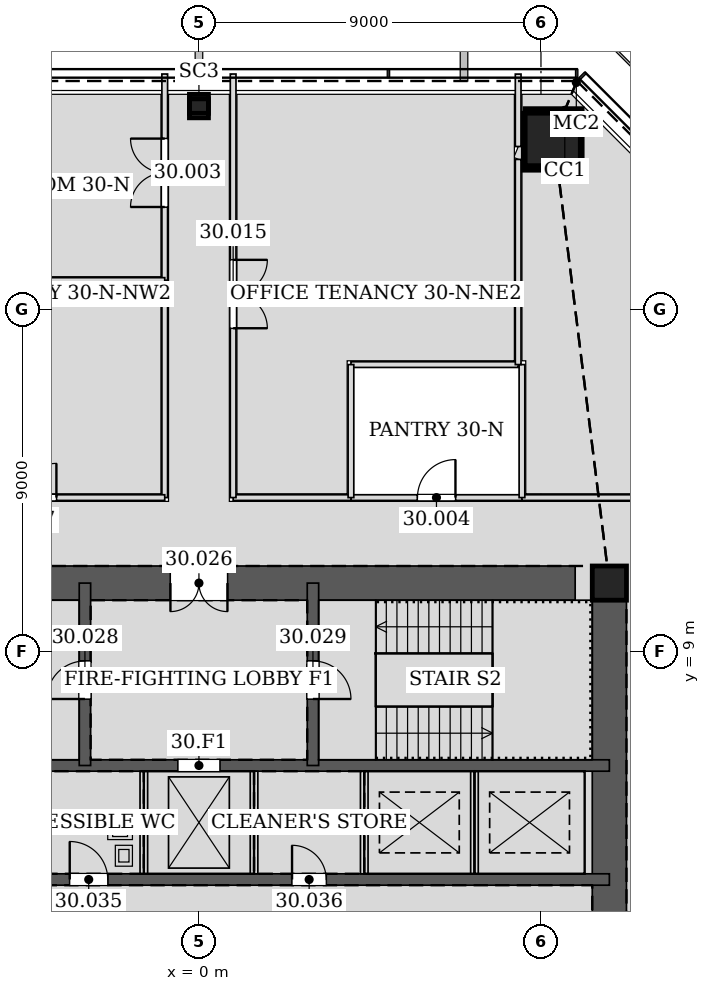
"""IFC4 building model, lengths in metres.
Left out: names, types, materials, properties, quantities, classifications, styles, units other than length and angle.
Written with IfcOpenShell. Run it as: python <this file> out.ifc"""

import sys

from ifc_helpers import new_model, si_unit, direction, frame, frame_2d, origin, origin_2d, place, context, subcontext, project, spatial, rectangle, hollow_rectangle, extrude, element, fill, save


model = new_model("IFC4")
c1 = context("Model", 3, precision=1e-05, world=origin(), true_north=direction((0.0, 1.0)))
c2 = subcontext(c1, "Body", "Model", "MODEL_VIEW")
j1 = project(units=[si_unit("LENGTHUNIT", "METRE"), si_unit("PLANEANGLEUNIT", "RADIAN")], contexts=[c1])
p1 = place(None, origin())
s1 = spatial("IfcSite", under=j1, at=p1, CompositionType="ELEMENT")
p2 = place(p1, origin())
s2 = spatial("IfcBuilding", under=s1, at=p2, CompositionType="ELEMENT")
p3 = place(p2, frame((0.0, 0.0, 134.4)))
s3 = spatial("IfcBuildingStorey", under=s2, at=p3, CompositionType="ELEMENT", Elevation=134.4)
p4 = place(p3, frame((9.334, 22.534, 0.0), z_axis=(-0.011677874129, -0.028236053864, 0.999533067246), x_axis=(0.924086310396, -0.382183844423, 0.0)))
e1 = element("IfcColumn", 1, at=p4, inside=s3, PredefinedType="COLUMN", context=c2, shape_type="SweptSolid", body=[
    extrude(hollow_rectangle(XDim=1.5, YDim=1.5, WallThickness=0.07, at=origin_2d()), origin(), (0.0, 0.0, 1.0), 4.202),
])
p5 = place(p3, frame((0.0, 23.413, 0.0), z_axis=(0.0, -0.02829603574, 0.999599587015), x_axis=(1.0, 0.0, 0.0)))
e2 = element("IfcColumn", 2, at=p5, inside=s3, PredefinedType="COLUMN", context=c2, shape_type="SweptSolid", body=[
    extrude(hollow_rectangle(XDim=0.5, YDim=0.5, WallThickness=0.025, at=origin_2d()), origin(), (0.0, 0.0, 1.0), 4.202),
])
p6 = place(p3, frame((10.8, 10.8, 0.0), z_axis=(0.0, 0.0, 1.0), x_axis=(1.0, 0.0, 0.0)))
e3 = element("IfcColumn", 3, at=p6, inside=s3, PredefinedType="COLUMN", context=c2, shape_type="SweptSolid", body=[
    extrude(hollow_rectangle(XDim=0.9, YDim=0.9, WallThickness=0.06, at=origin_2d()), origin(), (0.0, 0.0, 1.0), 4.2),
])
p7 = place(p3, frame((10.8, -10.8, 0.0), z_axis=(0.0, 0.0, 1.0), x_axis=(0.0, 1.0, 0.0)))
e4 = element("IfcWall", 4, at=p7, inside=s3, PredefinedType="SOLIDWALL", context=c2, shape_type="SweptSolid", body=[
    extrude(rectangle(XDim=21.6, YDim=0.9, at=frame_2d((10.8, 0.0))), origin(), (0.0, 0.0, 1.0), 4.2),
])
p8 = place(p7, frame((11.7, 0.0, 0.0)))
e5 = element("IfcOpeningElement", 5, at=p8, cuts=e4, PredefinedType="OPENING", context=c2, shape_type="SweptSolid", body=[
    extrude(rectangle(XDim=1.2, YDim=2.1, at=frame_2d((0.6, 1.05))), frame((0.0, 0.46, 0.0), z_axis=(0.0, -1.0, 0.0), x_axis=(1.0, 0.0, 0.0)), (0.0, 0.0, 1.0), 0.92),
])
p9 = place(p7, frame((8.7, 0.0, 0.0)))
e6 = element("IfcOpeningElement", 6, at=p9, cuts=e4, PredefinedType="OPENING", context=c2, shape_type="SweptSolid", body=[
    extrude(rectangle(XDim=1.2, YDim=2.1, at=frame_2d((0.6, 1.05))), frame((0.0, 0.46, 0.0), z_axis=(0.0, -1.0, 0.0), x_axis=(1.0, 0.0, 0.0)), (0.0, 0.0, 1.0), 0.92),
])
p10 = place(p3, frame((10.8, 10.8, 0.0), z_axis=(0.0, 0.0, 1.0), x_axis=(-1.0, 0.0, 0.0)))
e7 = element("IfcWall", 7, at=p10, inside=s3, PredefinedType="SOLIDWALL", context=c2, shape_type="SweptSolid", body=[
    extrude(rectangle(XDim=21.6, YDim=0.9, at=frame_2d((10.8, 0.0))), origin(), (0.0, 0.0, 1.0), 4.2),
])
p11 = place(p10, frame((10.05, 0.0, 0.0)))
e8 = element("IfcOpeningElement", 8, at=p11, cuts=e7, PredefinedType="OPENING", context=c2, shape_type="SweptSolid", body=[
    extrude(rectangle(XDim=1.5, YDim=2.1, at=frame_2d((0.75, 1.05))), frame((0.0, 0.46, 0.0), z_axis=(0.0, -1.0, 0.0), x_axis=(1.0, 0.0, 0.0)), (0.0, 0.0, 1.0), 0.92),
])
p12 = place(p3, frame((-10.8, 3.0, 0.0), z_axis=(0.0, 0.0, 1.0), x_axis=(1.0, 0.0, 0.0)))
e9 = element("IfcWall", 9, at=p12, inside=s3, PredefinedType="SOLIDWALL", context=c2, shape_type="SweptSolid", body=[
    extrude(rectangle(XDim=21.6, YDim=0.3, at=frame_2d((10.8, 0.0))), origin(), (0.0, 0.0, 1.0), 4.2),
])
p13 = place(p12, frame((1.65, 0.0, 0.0)))
e10 = element("IfcOpeningElement", 10, at=p13, cuts=e9, PredefinedType="OPENING", context=c2, shape_type="SweptSolid", body=[
    extrude(rectangle(XDim=0.9, YDim=2.1, at=frame_2d((0.45, 1.05))), frame((0.0, 0.16, 0.0), z_axis=(0.0, -1.0, 0.0), x_axis=(1.0, 0.0, 0.0)), (0.0, 0.0, 1.0), 0.32),
])
p14 = place(p12, frame((4.55, 0.0, 0.0)))
e11 = element("IfcOpeningElement", 11, at=p14, cuts=e9, PredefinedType="OPENING", context=c2, shape_type="SweptSolid", body=[
    extrude(rectangle(XDim=0.9, YDim=2.1, at=frame_2d((0.45, 1.05))), frame((0.0, 0.16, 0.0), z_axis=(0.0, -1.0, 0.0), x_axis=(1.0, 0.0, 0.0)), (0.0, 0.0, 1.0), 0.32),
])
p15 = place(p12, frame((7.4, 0.0, 0.0)))
e12 = element("IfcOpeningElement", 12, at=p15, cuts=e9, PredefinedType="OPENING", context=c2, shape_type="SweptSolid", body=[
    extrude(rectangle(XDim=1.0, YDim=2.1, at=frame_2d((0.5, 1.05))), frame((0.0, 0.16, 0.0), z_axis=(0.0, -1.0, 0.0), x_axis=(1.0, 0.0, 0.0)), (0.0, 0.0, 1.0), 0.32),
])
p16 = place(p12, frame((13.25, 0.0, 0.0)))
e13 = element("IfcOpeningElement", 13, at=p16, cuts=e9, PredefinedType="OPENING", context=c2, shape_type="SweptSolid", body=[
    extrude(rectangle(XDim=0.9, YDim=2.1, at=frame_2d((0.45, 1.05))), frame((0.0, 0.16, 0.0), z_axis=(0.0, -1.0, 0.0), x_axis=(1.0, 0.0, 0.0)), (0.0, 0.0, 1.0), 0.32),
])
p17 = place(p3, frame((-10.8, 6.0, 0.0), z_axis=(0.0, 0.0, 1.0), x_axis=(1.0, 0.0, 0.0)))
e14 = element("IfcWall", 14, at=p17, inside=s3, PredefinedType="SOLIDWALL", context=c2, shape_type="SweptSolid", body=[
    extrude(rectangle(XDim=21.6, YDim=0.3, at=frame_2d((10.8, 0.0))), origin(), (0.0, 0.0, 1.0), 4.2),
])
p18 = place(p17, frame((10.25, 0.0, 0.0)))
e15 = element("IfcOpeningElement", 15, at=p18, cuts=e14, PredefinedType="OPENING", context=c2, shape_type="SweptSolid", body=[
    extrude(rectangle(XDim=1.1, YDim=2.1, at=frame_2d((0.55, 1.05))), frame((0.0, 0.16, 0.0), z_axis=(0.0, -1.0, 0.0), x_axis=(1.0, 0.0, 0.0)), (0.0, 0.0, 1.0), 0.32),
])
p19 = place(p3, frame((-3.0, 6.0, 0.0), z_axis=(0.0, 0.0, 1.0), x_axis=(0.0, 1.0, 0.0)))
e16 = element("IfcWall", 16, at=p19, inside=s3, PredefinedType="SOLIDWALL", context=c2, shape_type="SweptSolid", body=[
    extrude(rectangle(XDim=4.8, YDim=0.3, at=frame_2d((2.4, 0.0))), origin(), (0.0, 0.0, 1.0), 4.2),
])
p20 = place(p19, frame((1.75, 0.0, 0.0)))
e17 = element("IfcOpeningElement", 17, at=p20, cuts=e16, PredefinedType="OPENING", context=c2, shape_type="SweptSolid", body=[
    extrude(rectangle(XDim=1.0, YDim=2.1, at=frame_2d((0.5, 1.05))), frame((0.0, 0.16, 0.0), z_axis=(0.0, -1.0, 0.0), x_axis=(1.0, 0.0, 0.0)), (0.0, 0.0, 1.0), 0.32),
])
p21 = place(p3, frame((3.0, 6.0, 0.0), z_axis=(0.0, 0.0, 1.0), x_axis=(0.0, 1.0, 0.0)))
e18 = element("IfcWall", 18, at=p21, inside=s3, PredefinedType="SOLIDWALL", context=c2, shape_type="SweptSolid", body=[
    extrude(rectangle(XDim=4.8, YDim=0.3, at=frame_2d((2.4, 0.0))), origin(), (0.0, 0.0, 1.0), 4.2),
])
p22 = place(p21, frame((1.75, 0.0, 0.0)))
e19 = element("IfcOpeningElement", 19, at=p22, cuts=e18, PredefinedType="OPENING", context=c2, shape_type="SweptSolid", body=[
    extrude(rectangle(XDim=1.0, YDim=2.1, at=frame_2d((0.5, 1.05))), frame((0.0, 0.16, 0.0), z_axis=(0.0, -1.0, 0.0), x_axis=(1.0, 0.0, 0.0)), (0.0, 0.0, 1.0), 0.32),
])
p23 = place(p3, frame((-0.9, 24.197, 0.0), z_axis=(0.0, 0.0, 1.0), x_axis=(0.0, -1.0, 0.0)))
e20 = element("IfcWall", 20, at=p23, inside=s3, PredefinedType="PARTITIONING", context=c2, shape_type="SweptSolid", body=[
    extrude(rectangle(XDim=5.435, YDim=0.15, at=frame_2d((2.718, 0.0))), origin(), (0.0, 0.0, 1.0), 3.426),
])
p24 = place(p23, frame((1.699, 0.0, 0.0)))
e21 = element("IfcOpeningElement", 21, at=p24, cuts=e20, PredefinedType="OPENING", context=c2, shape_type="SweptSolid", body=[
    extrude(rectangle(XDim=1.8, YDim=2.4, at=frame_2d((0.9, 1.2))), frame((0.0, 0.085, 0.0), z_axis=(0.0, -1.0, 0.0), x_axis=(1.0, 0.0, 0.0)), (0.0, 0.0, 1.0), 0.17),
])
p25 = place(p3, frame((8.501, 13.05, 0.0), z_axis=(0.0, 0.0, 1.0), x_axis=(-1.0, 0.0, 0.0)))
e22 = element("IfcWall", 22, at=p25, inside=s3, PredefinedType="PARTITIONING", context=c2, shape_type="SweptSolid", body=[
    extrude(rectangle(XDim=4.502, YDim=0.15, at=frame_2d((2.251, 0.0))), origin(), (0.0, 0.0, 1.0), 4.035),
])
p26 = place(p25, frame((1.751, 0.0, 0.0)))
e23 = element("IfcOpeningElement", 23, at=p26, cuts=e22, PredefinedType="OPENING", context=c2, shape_type="SweptSolid", body=[
    extrude(rectangle(XDim=1.0, YDim=2.1, at=frame_2d((0.5, 1.05))), frame((0.0, 0.085, 0.0), z_axis=(0.0, -1.0, 0.0), x_axis=(1.0, 0.0, 0.0)), (0.0, 0.0, 1.0), 0.17),
])
p27 = place(p3, frame((13.05, 13.05, 0.0), z_axis=(0.0, 0.0, 1.0), x_axis=(-1.0, 0.0, 0.0)))
e24 = element("IfcWall", 24, at=p27, inside=s3, PredefinedType="PARTITIONING", context=c2, shape_type="SweptSolid", body=[
    extrude(rectangle(XDim=4.551, YDim=0.15, at=frame_2d((2.275, 0.0))), origin(), (0.0, 0.0, 1.0), 3.042),
])
p28 = place(p3, frame((4.001, 13.05, 0.0), z_axis=(0.0, 0.0, 1.0), x_axis=(-1.0, 0.0, 0.0)))
e25 = element("IfcWall", 25, at=p28, inside=s3, PredefinedType="PARTITIONING", context=c2, shape_type="SweptSolid", body=[
    extrude(rectangle(XDim=3.101, YDim=0.15, at=frame_2d((1.551, 0.0))), origin(), (0.0, 0.0, 1.0), 4.035),
])
p29 = place(p3, frame((0.9, 13.05, 0.0), z_axis=(0.0, 0.0, 1.0), x_axis=(0.0, 1.0, 0.0)))
e26 = element("IfcWall", 26, at=p29, inside=s3, PredefinedType="PARTITIONING", context=c2, shape_type="SweptSolid", body=[
    extrude(rectangle(XDim=11.147, YDim=0.15, at=frame_2d((5.573, 0.0))), origin(), (0.0, 0.0, 1.0), 3.426),
])
p30 = place(p29, frame((4.456, 0.0, 0.0)))
e27 = element("IfcOpeningElement", 27, at=p30, cuts=e26, PredefinedType="OPENING", context=c2, shape_type="SweptSolid", body=[
    extrude(rectangle(XDim=1.8, YDim=2.4, at=frame_2d((0.9, 1.2))), frame((0.0, 0.085, 0.0), z_axis=(0.0, -1.0, 0.0), x_axis=(1.0, 0.0, 0.0)), (0.0, 0.0, 1.0), 0.17),
])
p31 = place(p3, frame((-0.9, 18.764, 0.0), z_axis=(0.0, 0.0, 1.0), x_axis=(0.0, -1.0, 0.0)))
e28 = element("IfcWall", 28, at=p31, inside=s3, PredefinedType="PARTITIONING", context=c2, shape_type="SweptSolid", body=[
    extrude(rectangle(XDim=5.714, YDim=0.15, at=frame_2d((2.857, 0.0))), origin(), (0.0, 0.0, 1.0), 3.426),
])
p32 = place(p3, frame((-0.9, 13.05, 0.0), z_axis=(0.0, 0.0, 1.0), x_axis=(-1.0, 0.0, 0.0)))
e29 = element("IfcWall", 29, at=p32, inside=s3, PredefinedType="PARTITIONING", context=c2, shape_type="SweptSolid", body=[
    extrude(rectangle(XDim=7.501, YDim=0.15, at=frame_2d((3.75, 0.0))), origin(), (0.0, 0.0, 1.0), 4.035),
])
p33 = place(p32, frame((2.851, 0.0, 0.0)))
e30 = element("IfcOpeningElement", 30, at=p33, cuts=e29, PredefinedType="OPENING", context=c2, shape_type="SweptSolid", body=[
    extrude(rectangle(XDim=1.8, YDim=2.4, at=frame_2d((0.9, 1.2))), frame((0.0, 0.085, 0.0), z_axis=(0.0, -1.0, 0.0), x_axis=(1.0, 0.0, 0.0)), (0.0, 0.0, 1.0), 0.17),
])
p34 = place(p3, frame((-8.0, 18.763, 0.0), z_axis=(0.0, 0.0, 1.0), x_axis=(1.0, 0.0, 0.0)))
e31 = element("IfcWall", 31, at=p34, inside=s3, PredefinedType="PARTITIONING", context=c2, shape_type="SweptSolid", body=[
    extrude(rectangle(XDim=7.1, YDim=0.15, at=frame_2d((3.55, 0.0))), origin(), (0.0, 0.0, 1.0), 4.035),
])
p35 = place(p3, frame((8.5, 13.05, 0.0), z_axis=(0.0, 0.0, 1.0), x_axis=(0.0, 1.0, 0.0)))
e32 = element("IfcWall", 32, at=p35, inside=s3, PredefinedType="PARTITIONING", context=c2, shape_type="SweptSolid", body=[
    extrude(rectangle(XDim=3.5, YDim=0.15, at=frame_2d((1.75, 0.0))), origin(), (0.0, 0.0, 1.0), 3.426),
])
p36 = place(p3, frame((8.401, 16.55, 0.0), z_axis=(0.0, 0.0, 1.0), x_axis=(-1.0, 0.0, 0.0)))
e33 = element("IfcWall", 33, at=p36, inside=s3, PredefinedType="PARTITIONING", context=c2, shape_type="SweptSolid", body=[
    extrude(rectangle(XDim=4.401, YDim=0.15, at=frame_2d((2.2, 0.0))), origin(), (0.0, 0.0, 1.0), 4.035),
])
p37 = place(p3, frame((4.0, 16.55, 0.0), z_axis=(0.0, 0.0, 1.0), x_axis=(0.0, -1.0, 0.0)))
e34 = element("IfcWall", 34, at=p37, inside=s3, PredefinedType="PARTITIONING", context=c2, shape_type="SweptSolid", body=[
    extrude(rectangle(XDim=3.5, YDim=0.15, at=frame_2d((1.75, 0.0))), origin(), (0.0, 0.0, 1.0), 3.426),
])
p38 = place(p3, frame((8.4, 24.195, 0.0), z_axis=(0.0, 0.0, 1.0), x_axis=(0.0, -1.0, 0.0)))
e35 = element("IfcWall", 35, at=p38, inside=s3, PredefinedType="PARTITIONING", context=c2, shape_type="SweptSolid", body=[
    extrude(rectangle(XDim=1.906, YDim=0.15, at=frame_2d((0.953, 0.0))), origin(), (0.0, 0.0, 1.0), 3.499),
])
p39 = place(p3, frame((8.4, 21.949, 0.0), z_axis=(0.0, 0.0, 1.0), x_axis=(0.0, -1.0, 0.0)))
e36 = element("IfcWall", 36, at=p39, inside=s3, PredefinedType="PARTITIONING", context=c2, shape_type="SweptSolid", body=[
    extrude(rectangle(XDim=5.399, YDim=0.15, at=frame_2d((2.7, 0.0))), origin(), (0.0, 0.0, 1.0), 3.426),
])
for number, where, z_axis, x_axis in (
    (37, (-1.45, 3.15, 0.0), (0.0, 0.0, 1.0), (0.0, 1.0, 0.0)),
    (38, (1.45, 3.15, 0.0), (0.0, 0.0, 1.0), (0.0, 1.0, 0.0)),
    (39, (4.35, 3.15, 0.0), (0.0, 0.0, 1.0), (0.0, 1.0, 0.0)),
):
    element("IfcWall", number, at=place(p3, frame(where, z_axis=z_axis, x_axis=x_axis)), inside=s3, PredefinedType="PARTITIONING", context=c2, shape_type="SweptSolid", body=[
        extrude(rectangle(XDim=2.7, YDim=0.2, at=frame_2d((1.35, 0.0))), origin(), (0.0, 0.0, 1.0), 4.035),
    ])
p40 = place(p3, frame((7.25, 3.15, 0.0), z_axis=(0.0, 0.0, 1.0), x_axis=(0.0, 1.0, 0.0)))
e40 = element("IfcWall", 40, at=p40, inside=s3, PredefinedType="PARTITIONING", context=c2, shape_type="SweptSolid", body=[
    extrude(rectangle(XDim=2.7, YDim=0.2, at=frame_2d((1.35, 0.0))), origin(), (0.0, 0.0, 1.0), 4.2),
])
p41 = place(p24, frame((1.8, 0.0, 0.0), z_axis=(0.0, 0.0, 1.0), x_axis=(-1.0, 0.0, 0.0)))
e41 = element("IfcDoor", 41, at=p41, inside=s3, OperationType="DOUBLE_DOOR_SINGLE_SWING", PredefinedType="DOOR", context=c2, shape_type="SweptSolid", body=[
    extrude(rectangle(XDim=1.8, YDim=2.4, at=frame_2d((0.9, 1.2))), frame((0.0, 0.025, 0.0), z_axis=(0.0, -1.0, 0.0), x_axis=(1.0, 0.0, 0.0)), (0.0, 0.0, 1.0), 0.05),
])
fill(e21, e41)
p42 = place(p26, frame((1.0, 0.0, 0.0), z_axis=(0.0, 0.0, 1.0), x_axis=(-1.0, 0.0, 0.0)))
e42 = element("IfcDoor", 42, at=p42, inside=s3, OperationType="SINGLE_SWING_RIGHT", PredefinedType="DOOR", context=c2, shape_type="SweptSolid", body=[
    extrude(rectangle(XDim=1.0, YDim=2.1, at=frame_2d((0.5, 1.05))), frame((0.0, 0.025, 0.0), z_axis=(0.0, -1.0, 0.0), x_axis=(1.0, 0.0, 0.0)), (0.0, 0.0, 1.0), 0.05),
])
fill(e23, e42)
p43 = place(p30, frame((1.8, 0.0, 0.0), z_axis=(0.0, 0.0, 1.0), x_axis=(-1.0, 0.0, 0.0)))
e43 = element("IfcDoor", 43, at=p43, inside=s3, OperationType="DOUBLE_DOOR_SINGLE_SWING", PredefinedType="DOOR", context=c2, shape_type="SweptSolid", body=[
    extrude(rectangle(XDim=1.8, YDim=2.4, at=frame_2d((0.9, 1.2))), frame((0.0, 0.025, 0.0), z_axis=(0.0, -1.0, 0.0), x_axis=(1.0, 0.0, 0.0)), (0.0, 0.0, 1.0), 0.05),
])
fill(e27, e43)
p44 = place(p33, frame((1.8, 0.0, 0.0), z_axis=(0.0, 0.0, 1.0), x_axis=(-1.0, 0.0, 0.0)))
e44 = element("IfcDoor", 44, at=p44, inside=s3, OperationType="DOUBLE_DOOR_SINGLE_SWING", PredefinedType="DOOR", context=c2, shape_type="SweptSolid", body=[
    extrude(rectangle(XDim=1.8, YDim=2.4, at=frame_2d((0.9, 1.2))), frame((0.0, 0.025, 0.0), z_axis=(0.0, -1.0, 0.0), x_axis=(1.0, 0.0, 0.0)), (0.0, 0.0, 1.0), 0.05),
])
fill(e30, e44)
p45 = place(p11, origin())
e45 = element("IfcDoor", 45, at=p45, inside=s3, OperationType="DOUBLE_DOOR_SINGLE_SWING", PredefinedType="DOOR", context=c2, shape_type="SweptSolid", body=[
    extrude(rectangle(XDim=1.5, YDim=2.1, at=frame_2d((0.75, 1.05))), frame((0.0, 0.025, 0.0), z_axis=(0.0, -1.0, 0.0), x_axis=(1.0, 0.0, 0.0)), (0.0, 0.0, 1.0), 0.05),
])
fill(e8, e45)
p46 = place(p20, origin())
e46 = element("IfcDoor", 46, at=p46, inside=s3, OperationType="SINGLE_SWING_LEFT", PredefinedType="DOOR", context=c2, shape_type="SweptSolid", body=[
    extrude(rectangle(XDim=1.0, YDim=2.1, at=frame_2d((0.5, 1.05))), frame((0.0, 0.025, 0.0), z_axis=(0.0, -1.0, 0.0), x_axis=(1.0, 0.0, 0.0)), (0.0, 0.0, 1.0), 0.05),
])
fill(e17, e46)
p47 = place(p22, frame((1.0, 0.0, 0.0), z_axis=(0.0, 0.0, 1.0), x_axis=(-1.0, 0.0, 0.0)))
e47 = element("IfcDoor", 47, at=p47, inside=s3, OperationType="SINGLE_SWING_RIGHT", PredefinedType="DOOR", context=c2, shape_type="SweptSolid", body=[
    extrude(rectangle(XDim=1.0, YDim=2.1, at=frame_2d((0.5, 1.05))), frame((0.0, 0.025, 0.0), z_axis=(0.0, -1.0, 0.0), x_axis=(1.0, 0.0, 0.0)), (0.0, 0.0, 1.0), 0.05),
])
fill(e19, e47)
p48 = place(p15, origin())
e48 = element("IfcDoor", 48, at=p48, inside=s3, OperationType="SINGLE_SWING_LEFT", PredefinedType="DOOR", context=c2, shape_type="SweptSolid", body=[
    extrude(rectangle(XDim=1.0, YDim=2.1, at=frame_2d((0.5, 1.05))), frame((0.0, 0.025, 0.0), z_axis=(0.0, -1.0, 0.0), x_axis=(1.0, 0.0, 0.0)), (0.0, 0.0, 1.0), 0.05),
])
fill(e12, e48)
p49 = place(p16, origin())
e49 = element("IfcDoor", 49, at=p49, inside=s3, OperationType="SINGLE_SWING_LEFT", PredefinedType="DOOR", context=c2, shape_type="SweptSolid", body=[
    extrude(rectangle(XDim=0.9, YDim=2.1, at=frame_2d((0.45, 1.05))), frame((0.0, 0.025, 0.0), z_axis=(0.0, -1.0, 0.0), x_axis=(1.0, 0.0, 0.0)), (0.0, 0.0, 1.0), 0.05),
])
fill(e13, e49)
p50 = place(p18, origin())
e50 = element("IfcDoor", 50, at=p50, inside=s3, OperationType="DOUBLE_DOOR_SLIDING", PredefinedType="DOOR", context=c2, shape_type="SweptSolid", body=[
    extrude(rectangle(XDim=1.1, YDim=2.1, at=frame_2d((0.55, 1.05))), frame((0.0, 0.025, 0.0), z_axis=(0.0, -1.0, 0.0), x_axis=(1.0, 0.0, 0.0)), (0.0, 0.0, 1.0), 0.05),
])
fill(e15, e50)
save(model, sys.argv[1])
